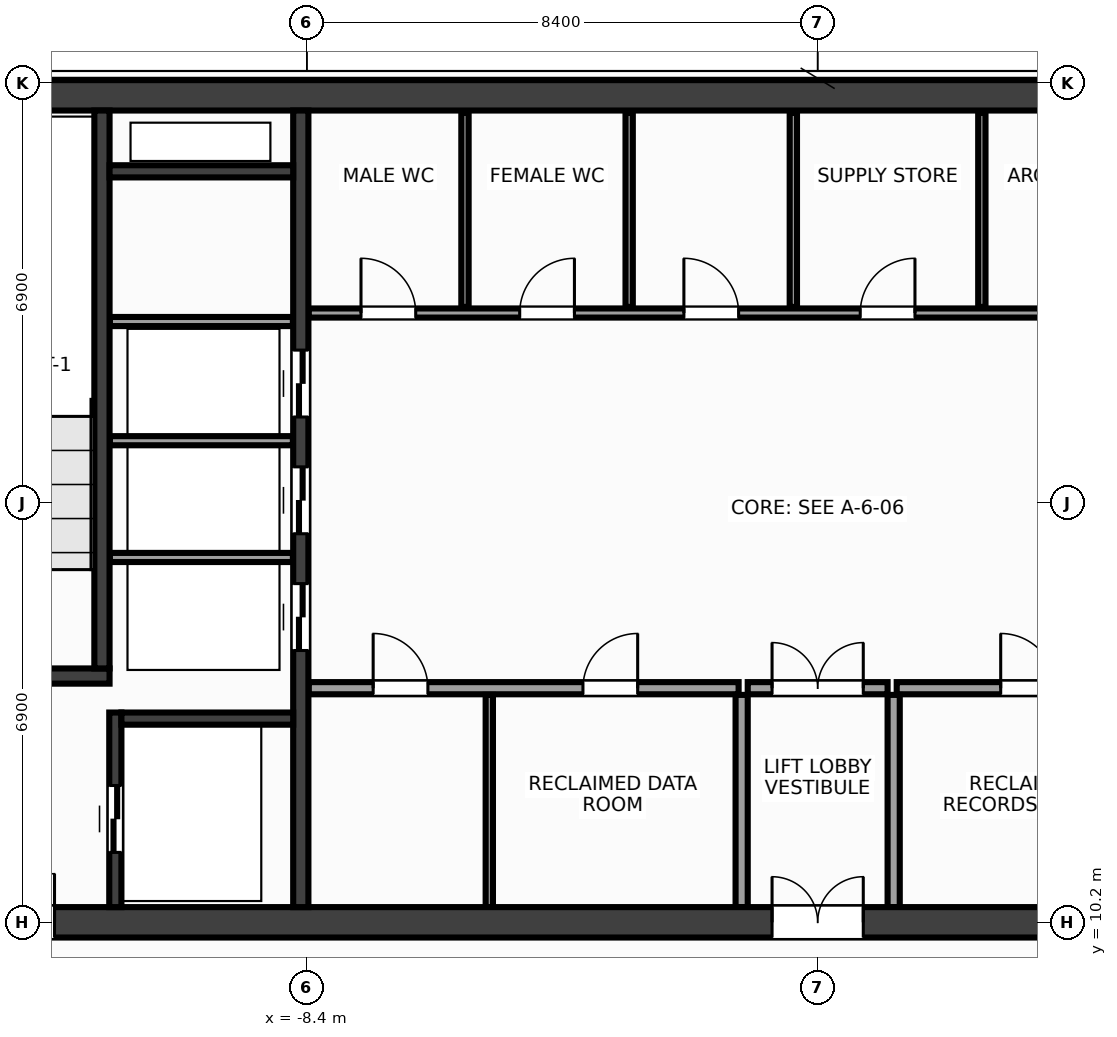
"""IFC4 building model, lengths in metres.
Left out: names, types, materials, properties, quantities, classifications, styles, units other than length and angle.
Written with IfcOpenShell. Run it as: python <this file> out.ifc"""

import sys

from ifc_helpers import new_model, si_unit, direction, frame, frame_2d, origin, place, context, subcontext, project, spatial, rectangle, extrude, source, transform, mapped, element, fill, save


model = new_model("IFC4")
c1 = context("Model", 3, precision=1e-05, world=origin(), true_north=direction((0.0, 1.0)))
c2 = subcontext(c1, "Body", "Model", "MODEL_VIEW")
j1 = project(units=[si_unit("LENGTHUNIT", "METRE"), si_unit("PLANEANGLEUNIT", "RADIAN")], contexts=[c1])
p1 = place(None, origin())
s1 = spatial("IfcSite", under=j1, at=p1, CompositionType="ELEMENT")
p2 = place(p1, origin())
s2 = spatial("IfcBuilding", under=s1, at=p2, CompositionType="ELEMENT")
p3 = place(p2, frame((0.0, 0.0, 261.2)))
s3 = spatial("IfcBuildingStorey", under=s2, at=p3, CompositionType="ELEMENT", Elevation=261.2)
m1 = source(origin(), c2, "Body", "SweptSolid", [
    extrude(rectangle(XDim=31.7, YDim=0.5, at=frame_2d((15.85, 0.0))), origin(), (0.0, 0.0, 1.0), 3.6),
])
p4 = place(p3, frame((-15.85, 23.8, 0.0), z_axis=(0.0, 0.0, 1.0), x_axis=(1.0, 0.0, 0.0)))
e1 = element("IfcWall", 1, at=p4, inside=s3, PredefinedType="SHEAR", context=c2, shape_type="MappedRepresentation", body=[
    mapped(m1, transform((0.0, 0.0, 0.0), x_axis=(1.0, 0.0, 0.0), y_axis=(0.0, 1.0, 0.0), z_axis=(0.0, 0.0, 1.0), scale=1.0)),
])
p5 = place(p3, frame((-15.85, 10.2, 0.0), z_axis=(0.0, 0.0, 1.0), x_axis=(1.0, 0.0, 0.0)))
e2 = element("IfcWall", 2, at=p5, inside=s3, PredefinedType="SHEAR", context=c2, shape_type="MappedRepresentation", body=[
    mapped(m1, transform((0.0, 0.0, 0.0), x_axis=(1.0, 0.0, 0.0), y_axis=(0.0, 1.0, 0.0), z_axis=(0.0, 0.0, 1.0), scale=1.0)),
])
p6 = place(p5, frame((1.7, 0.0, 0.0)))
e3 = element("IfcOpeningElement", 3, at=p6, cuts=e2, PredefinedType="OPENING", context=c2, shape_type="SweptSolid", body=[
    extrude(rectangle(XDim=1.6, YDim=2.15, at=frame_2d((0.8, 1.075))), frame((0.0, 0.262, 0.0), z_axis=(0.0, -1.0, 0.0), x_axis=(1.0, 0.0, 0.0)), (0.0, 0.0, 1.0), 0.524),
])
p7 = place(p5, frame((28.4, 0.0, 0.0)))
e4 = element("IfcOpeningElement", 4, at=p7, cuts=e2, PredefinedType="OPENING", context=c2, shape_type="SweptSolid", body=[
    extrude(rectangle(XDim=1.6, YDim=2.15, at=frame_2d((0.8, 1.075))), frame((0.0, 0.262, 0.0), z_axis=(0.0, -1.0, 0.0), x_axis=(1.0, 0.0, 0.0)), (0.0, 0.0, 1.0), 0.524),
])
p8 = place(p5, frame((15.1, 0.0, 0.0)))
e5 = element("IfcOpeningElement", 5, at=p8, cuts=e2, PredefinedType="OPENING", context=c2, shape_type="SweptSolid", body=[
    extrude(rectangle(XDim=1.5, YDim=2.2, at=frame_2d((0.75, 1.1))), frame((0.0, 0.262, 0.0), z_axis=(0.0, -1.0, 0.0), x_axis=(1.0, 0.0, 0.0)), (0.0, 0.0, 1.0), 0.524),
])
m2 = source(origin(), c2, "Body", "SweptSolid", [
    extrude(rectangle(XDim=13.1, YDim=0.25, at=frame_2d((6.55, 0.0))), origin(), (0.0, 0.0, 1.0), 3.6),
])
p9 = place(p3, frame((-8.5, 10.45, 0.0), z_axis=(0.0, 0.0, 1.0), x_axis=(0.0, 1.0, 0.0)))
e6 = element("IfcWall", 6, at=p9, inside=s3, PredefinedType="SHEAR", context=c2, shape_type="MappedRepresentation", body=[
    mapped(m2, transform((0.0, 0.0, 0.0), x_axis=(1.0, 0.0, 0.0), y_axis=(0.0, 1.0, 0.0), z_axis=(0.0, 0.0, 1.0), scale=1.0)),
])
p10 = place(p9, frame((4.22, 0.0, 0.0)))
e7 = element("IfcOpeningElement", 7, at=p10, cuts=e6, PredefinedType="OPENING", context=c2, shape_type="SweptSolid", body=[
    extrude(rectangle(XDim=1.1, YDim=2.15, at=frame_2d((0.55, 1.075))), frame((0.0, 0.137, 0.0), z_axis=(0.0, -1.0, 0.0), x_axis=(1.0, 0.0, 0.0)), (0.0, 0.0, 1.0), 0.274),
])
p11 = place(p9, frame((6.14, 0.0, 0.0)))
e8 = element("IfcOpeningElement", 8, at=p11, cuts=e6, PredefinedType="OPENING", context=c2, shape_type="SweptSolid", body=[
    extrude(rectangle(XDim=1.1, YDim=2.15, at=frame_2d((0.55, 1.075))), frame((0.0, 0.137, 0.0), z_axis=(0.0, -1.0, 0.0), x_axis=(1.0, 0.0, 0.0)), (0.0, 0.0, 1.0), 0.274),
])
p12 = place(p9, frame((8.06, 0.0, 0.0)))
e9 = element("IfcOpeningElement", 9, at=p12, cuts=e6, PredefinedType="OPENING", context=c2, shape_type="SweptSolid", body=[
    extrude(rectangle(XDim=1.1, YDim=2.15, at=frame_2d((0.55, 1.075))), frame((0.0, 0.137, 0.0), z_axis=(0.0, -1.0, 0.0), x_axis=(1.0, 0.0, 0.0)), (0.0, 0.0, 1.0), 0.274),
])
m3 = source(origin(), c2, "Body", "SweptSolid", [
    extrude(rectangle(XDim=3.705, YDim=0.25, at=frame_2d((1.853, 0.0))), origin(), (0.0, 0.0, 1.0), 3.6),
])
p13 = place(p3, frame((-15.35, 14.25, 0.0), z_axis=(0.0, 0.0, 1.0), x_axis=(1.0, 0.0, 0.0)))
e10 = element("IfcWall", 10, at=p13, inside=s3, PredefinedType="SHEAR", context=c2, shape_type="MappedRepresentation", body=[
    mapped(m3, transform((0.0, 0.0, 0.0), x_axis=(1.0, 0.0, 0.0), y_axis=(0.0, 1.0, 0.0), z_axis=(0.0, 0.0, 1.0), scale=1.0)),
])
p14 = place(p13, frame((0.95, 0.0, 0.0)))
e11 = element("IfcOpeningElement", 11, at=p14, cuts=e10, PredefinedType="OPENING", context=c2, shape_type="SweptSolid", body=[
    extrude(rectangle(XDim=1.6, YDim=2.15, at=frame_2d((0.8, 1.075))), frame((0.0, 0.137, 0.0), z_axis=(0.0, -1.0, 0.0), x_axis=(1.0, 0.0, 0.0)), (0.0, 0.0, 1.0), 0.274),
])
m4 = source(origin(), c2, "Body", "SweptSolid", [
    extrude(rectangle(XDim=9.175, YDim=0.25, at=frame_2d((4.587, 0.0))), origin(), (0.0, 0.0, 1.0), 3.6),
])
p15 = place(p3, frame((-11.77, 14.375, 0.0), z_axis=(0.0, 0.0, 1.0), x_axis=(0.0, 1.0, 0.0)))
e12 = element("IfcWall", 12, at=p15, inside=s3, PredefinedType="SHEAR", context=c2, shape_type="MappedRepresentation", body=[
    mapped(m4, transform((0.0, 0.0, 0.0), x_axis=(1.0, 0.0, 0.0), y_axis=(0.0, 1.0, 0.0), z_axis=(0.0, 0.0, 1.0), scale=1.0)),
])
m5 = source(origin(), c2, "Body", "SweptSolid", [
    extrude(rectangle(XDim=3.2, YDim=0.2, at=frame_2d((1.6, 0.0))), origin(), (0.0, 0.0, 1.0), 3.6),
])
p16 = place(p3, frame((-11.55, 10.45, 0.0), z_axis=(0.0, 0.0, 1.0), x_axis=(0.0, 1.0, 0.0)))
e13 = element("IfcWall", 13, at=p16, inside=s3, PredefinedType="SHEAR", context=c2, shape_type="MappedRepresentation", body=[
    mapped(m5, transform((0.0, 0.0, 0.0), x_axis=(1.0, 0.0, 0.0), y_axis=(0.0, 1.0, 0.0), z_axis=(0.0, 0.0, 1.0), scale=1.0)),
])
p17 = place(p16, frame((0.9, 0.0, 0.0)))
e14 = element("IfcOpeningElement", 14, at=p17, cuts=e13, PredefinedType="OPENING", context=c2, shape_type="SweptSolid", body=[
    extrude(rectangle(XDim=1.1, YDim=2.15, at=frame_2d((0.55, 1.075))), frame((0.0, 0.112, 0.0), z_axis=(0.0, -1.0, 0.0), x_axis=(1.0, 0.0, 0.0)), (0.0, 0.0, 1.0), 0.224),
])
m6 = source(origin(), c2, "Body", "SweptSolid", [
    extrude(rectangle(XDim=2.825, YDim=0.2, at=frame_2d((1.413, 0.0))), origin(), (0.0, 0.0, 1.0), 3.6),
])
p18 = place(p3, frame((-11.45, 13.55, 0.0), z_axis=(0.0, 0.0, 1.0), x_axis=(1.0, 0.0, 0.0)))
e15 = element("IfcWall", 15, at=p18, inside=s3, PredefinedType="SHEAR", context=c2, shape_type="MappedRepresentation", body=[
    mapped(m6, transform((0.0, 0.0, 0.0), x_axis=(1.0, 0.0, 0.0), y_axis=(0.0, 1.0, 0.0), z_axis=(0.0, 0.0, 1.0), scale=1.0)),
])
m7 = source(origin(), c2, "Body", "SweptSolid", [
    extrude(rectangle(XDim=3.02, YDim=0.2, at=frame_2d((1.51, 0.0))), origin(), (0.0, 0.0, 1.0), 3.6),
])
p19 = place(p3, frame((-11.645, 22.55, 0.0), z_axis=(0.0, 0.0, 1.0), x_axis=(1.0, 0.0, 0.0)))
e16 = element("IfcWall", 16, at=p19, inside=s3, PredefinedType="SHEAR", context=c2, shape_type="MappedRepresentation", body=[
    mapped(m7, transform((0.0, 0.0, 0.0), x_axis=(1.0, 0.0, 0.0), y_axis=(0.0, 1.0, 0.0), z_axis=(0.0, 0.0, 1.0), scale=1.0)),
])
m8 = source(origin(), c2, "Body", "SweptSolid", [
    extrude(rectangle(XDim=3.01, YDim=0.15, at=frame_2d((1.505, 0.0))), origin(), (0.0, 0.0, 1.0), 3.37),
])
for number, where, z_axis, x_axis in (
    (17, (-11.64, 16.2, 0.0), (0.0, 0.0, 1.0), (1.0, 0.0, 0.0)),
    (18, (-11.64, 18.12, 0.0), (0.0, 0.0, 1.0), (1.0, 0.0, 0.0)),
    (19, (-11.64, 20.08, 0.0), (0.0, 0.0, 1.0), (1.0, 0.0, 0.0)),
):
    element("IfcWall", number, at=place(p3, frame(where, z_axis=z_axis, x_axis=x_axis)), inside=s3, PredefinedType="PARTITIONING", context=c2, shape_type="MappedRepresentation", body=[
        mapped(m8, transform((0.0, 0.0, 0.0), x_axis=(1.0, 0.0, 0.0), y_axis=(0.0, 1.0, 0.0), z_axis=(0.0, 0.0, 1.0), scale=1.0)),
    ])
m9 = source(origin(), c2, "Body", "SweptSolid", [
    extrude(rectangle(XDim=7.07, YDim=0.2, at=frame_2d((3.535, 0.0))), origin(), (0.0, 0.0, 1.0), 3.37),
])
p20 = place(p3, frame((-8.37, 14.05, 0.0), z_axis=(0.0, 0.0, 1.0), x_axis=(1.0, 0.0, 0.0)))
e20 = element("IfcWall", 20, at=p20, inside=s3, PredefinedType="PARTITIONING", context=c2, shape_type="MappedRepresentation", body=[
    mapped(m9, transform((0.0, 0.0, 0.0), x_axis=(1.0, 0.0, 0.0), y_axis=(0.0, 1.0, 0.0), z_axis=(0.0, 0.0, 1.0), scale=1.0)),
])
p21 = place(p20, frame((1.06, 0.0, 0.0)))
e21 = element("IfcOpeningElement", 21, at=p21, cuts=e20, PredefinedType="OPENING", context=c2, shape_type="SweptSolid", body=[
    extrude(rectangle(XDim=0.9, YDim=2.15, at=frame_2d((0.45, 1.075))), frame((0.0, 0.112, 0.0), z_axis=(0.0, -1.0, 0.0), x_axis=(1.0, 0.0, 0.0)), (0.0, 0.0, 1.0), 0.224),
])
p22 = place(p20, frame((4.51, 0.0, 0.0)))
e22 = element("IfcOpeningElement", 22, at=p22, cuts=e20, PredefinedType="OPENING", context=c2, shape_type="SweptSolid", body=[
    extrude(rectangle(XDim=0.9, YDim=2.15, at=frame_2d((0.45, 1.075))), frame((0.0, 0.112, 0.0), z_axis=(0.0, -1.0, 0.0), x_axis=(1.0, 0.0, 0.0)), (0.0, 0.0, 1.0), 0.224),
])
p23 = place(p3, frame((1.3, 14.05, 0.0), z_axis=(0.0, 0.0, 1.0), x_axis=(1.0, 0.0, 0.0)))
e23 = element("IfcWall", 23, at=p23, inside=s3, PredefinedType="PARTITIONING", context=c2, shape_type="MappedRepresentation", body=[
    mapped(m9, transform((0.0, 0.0, 0.0), x_axis=(1.0, 0.0, 0.0), y_axis=(0.0, 1.0, 0.0), z_axis=(0.0, 0.0, 1.0), scale=1.0)),
])
p24 = place(p23, frame((1.71, 0.0, 0.0)))
e24 = element("IfcOpeningElement", 24, at=p24, cuts=e23, PredefinedType="OPENING", context=c2, shape_type="SweptSolid", body=[
    extrude(rectangle(XDim=0.9, YDim=2.15, at=frame_2d((0.45, 1.075))), frame((0.0, 0.112, 0.0), z_axis=(0.0, -1.0, 0.0), x_axis=(1.0, 0.0, 0.0)), (0.0, 0.0, 1.0), 0.224),
])
p25 = place(p23, frame((5.16, 0.0, 0.0)))
e25 = element("IfcOpeningElement", 25, at=p25, cuts=e23, PredefinedType="OPENING", context=c2, shape_type="SweptSolid", body=[
    extrude(rectangle(XDim=0.9, YDim=2.15, at=frame_2d((0.45, 1.075))), frame((0.0, 0.112, 0.0), z_axis=(0.0, -1.0, 0.0), x_axis=(1.0, 0.0, 0.0)), (0.0, 0.0, 1.0), 0.224),
])
m10 = source(origin(), c2, "Body", "SweptSolid", [
    extrude(rectangle(XDim=3.49, YDim=0.2, at=frame_2d((1.745, 0.0))), origin(), (0.0, 0.0, 1.0), 3.37),
])
for number, where, z_axis, x_axis in (
    (26, (-1.25, 10.45, 0.0), (0.0, 0.0, 1.0), (0.0, 1.0, 0.0)),
    (27, (1.25, 10.45, 0.0), (0.0, 0.0, 1.0), (0.0, 1.0, 0.0)),
):
    element("IfcWall", number, at=place(p3, frame(where, z_axis=z_axis, x_axis=x_axis)), inside=s3, PredefinedType="PARTITIONING", context=c2, shape_type="MappedRepresentation", body=[
        mapped(m10, transform((0.0, 0.0, 0.0), x_axis=(1.0, 0.0, 0.0), y_axis=(0.0, 1.0, 0.0), z_axis=(0.0, 0.0, 1.0), scale=1.0)),
    ])
m11 = source(origin(), c2, "Body", "SweptSolid", [
    extrude(rectangle(XDim=2.3, YDim=0.2, at=frame_2d((1.15, 0.0))), origin(), (0.0, 0.0, 1.0), 3.37),
])
p26 = place(p3, frame((-1.15, 14.05, 0.0), z_axis=(0.0, 0.0, 1.0), x_axis=(1.0, 0.0, 0.0)))
e28 = element("IfcWall", 28, at=p26, inside=s3, PredefinedType="PARTITIONING", context=c2, shape_type="MappedRepresentation", body=[
    mapped(m11, transform((0.0, 0.0, 0.0), x_axis=(1.0, 0.0, 0.0), y_axis=(0.0, 1.0, 0.0), z_axis=(0.0, 0.0, 1.0), scale=1.0)),
])
p27 = place(p26, frame((0.4, 0.0, 0.0)))
e29 = element("IfcOpeningElement", 29, at=p27, cuts=e28, PredefinedType="OPENING", context=c2, shape_type="SweptSolid", body=[
    extrude(rectangle(XDim=1.5, YDim=2.2, at=frame_2d((0.75, 1.1))), frame((0.0, 0.112, 0.0), z_axis=(0.0, -1.0, 0.0), x_axis=(1.0, 0.0, 0.0)), (0.0, 0.0, 1.0), 0.224),
])
m12 = source(origin(), c2, "Body", "SweptSolid", [
    extrude(rectangle(XDim=14.59, YDim=0.15, at=frame_2d((7.295, 0.0))), origin(), (0.0, 0.0, 1.0), 3.37),
])
p28 = place(p3, frame((-8.37, 20.22, 0.0), z_axis=(0.0, 0.0, 1.0), x_axis=(1.0, 0.0, 0.0)))
e30 = element("IfcWall", 30, at=p28, inside=s3, PredefinedType="PARTITIONING", context=c2, shape_type="MappedRepresentation", body=[
    mapped(m12, transform((0.0, 0.0, 0.0), x_axis=(1.0, 0.0, 0.0), y_axis=(0.0, 1.0, 0.0), z_axis=(0.0, 0.0, 1.0), scale=1.0)),
])
p29 = place(p28, frame((0.86, 0.0, 0.0)))
e31 = element("IfcOpeningElement", 31, at=p29, cuts=e30, PredefinedType="OPENING", context=c2, shape_type="SweptSolid", body=[
    extrude(rectangle(XDim=0.9, YDim=2.15, at=frame_2d((0.45, 1.075))), frame((0.0, 0.087, 0.0), z_axis=(0.0, -1.0, 0.0), x_axis=(1.0, 0.0, 0.0)), (0.0, 0.0, 1.0), 0.174),
])
p30 = place(p28, frame((3.47, 0.0, 0.0)))
e32 = element("IfcOpeningElement", 32, at=p30, cuts=e30, PredefinedType="OPENING", context=c2, shape_type="SweptSolid", body=[
    extrude(rectangle(XDim=0.9, YDim=2.15, at=frame_2d((0.45, 1.075))), frame((0.0, 0.087, 0.0), z_axis=(0.0, -1.0, 0.0), x_axis=(1.0, 0.0, 0.0)), (0.0, 0.0, 1.0), 0.174),
])
p31 = place(p28, frame((6.17, 0.0, 0.0)))
e33 = element("IfcOpeningElement", 33, at=p31, cuts=e30, PredefinedType="OPENING", context=c2, shape_type="SweptSolid", body=[
    extrude(rectangle(XDim=0.9, YDim=2.15, at=frame_2d((0.45, 1.075))), frame((0.0, 0.087, 0.0), z_axis=(0.0, -1.0, 0.0), x_axis=(1.0, 0.0, 0.0)), (0.0, 0.0, 1.0), 0.174),
])
p32 = place(p28, frame((9.07, 0.0, 0.0)))
e34 = element("IfcOpeningElement", 34, at=p32, cuts=e30, PredefinedType="OPENING", context=c2, shape_type="SweptSolid", body=[
    extrude(rectangle(XDim=0.9, YDim=2.15, at=frame_2d((0.45, 1.075))), frame((0.0, 0.087, 0.0), z_axis=(0.0, -1.0, 0.0), x_axis=(1.0, 0.0, 0.0)), (0.0, 0.0, 1.0), 0.174),
])
p33 = place(p28, frame((12.32, 0.0, 0.0)))
e35 = element("IfcOpeningElement", 35, at=p33, cuts=e30, PredefinedType="OPENING", context=c2, shape_type="SweptSolid", body=[
    extrude(rectangle(XDim=0.9, YDim=2.15, at=frame_2d((0.45, 1.075))), frame((0.0, 0.087, 0.0), z_axis=(0.0, -1.0, 0.0), x_axis=(1.0, 0.0, 0.0)), (0.0, 0.0, 1.0), 0.174),
])
m13 = source(origin(), c2, "Body", "SweptSolid", [
    extrude(rectangle(XDim=3.49, YDim=0.12, at=frame_2d((1.745, 0.0))), origin(), (0.0, 0.0, 1.0), 3.37),
])
p34 = place(p3, frame((-5.4, 10.45, 0.0), z_axis=(0.0, 0.0, 1.0), x_axis=(0.0, 1.0, 0.0)))
e36 = element("IfcWall", 36, at=p34, inside=s3, PredefinedType="PARTITIONING", context=c2, shape_type="MappedRepresentation", body=[
    mapped(m13, transform((0.0, 0.0, 0.0), x_axis=(1.0, 0.0, 0.0), y_axis=(0.0, 1.0, 0.0), z_axis=(0.0, 0.0, 1.0), scale=1.0)),
])
m14 = source(origin(), c2, "Body", "SweptSolid", [
    extrude(rectangle(XDim=3.19, YDim=0.12, at=frame_2d((1.595, 0.0))), origin(), (0.0, 0.0, 1.0), 3.37),
])
for number, where, z_axis, x_axis in (
    (37, (-5.8, 20.32, 0.0), (0.0, 0.0, 1.0), (0.0, 1.0, 0.0)),
    (38, (-3.1, 20.32, 0.0), (0.0, 0.0, 1.0), (0.0, 1.0, 0.0)),
    (39, (-0.4, 20.32, 0.0), (0.0, 0.0, 1.0), (0.0, 1.0, 0.0)),
    (40, (2.7, 20.32, 0.0), (0.0, 0.0, 1.0), (0.0, 1.0, 0.0)),
):
    element("IfcWall", number, at=place(p3, frame(where, z_axis=z_axis, x_axis=x_axis)), inside=s3, PredefinedType="PARTITIONING", context=c2, shape_type="MappedRepresentation", body=[
        mapped(m14, transform((0.0, 0.0, 0.0), x_axis=(1.0, 0.0, 0.0), y_axis=(0.0, 1.0, 0.0), z_axis=(0.0, 0.0, 1.0), scale=1.0)),
    ])
m15 = source(origin(), c2, "Body", "SweptSolid", [
    extrude(rectangle(XDim=1.6, YDim=2.15, at=frame_2d((0.8, 1.075))), frame((0.0, 0.025, 0.0), z_axis=(0.0, -1.0, 0.0), x_axis=(1.0, 0.0, 0.0)), (0.0, 0.0, 1.0), 0.05),
])
p35 = place(p6, origin())
e41 = element("IfcDoor", 41, at=p35, inside=s3, OperationType="DOUBLE_DOOR_SINGLE_SWING", PredefinedType="DOOR", context=c2, shape_type="MappedRepresentation", body=[
    mapped(m15, transform((0.0, 0.0, 0.0), x_axis=(1.0, 0.0, 0.0), y_axis=(0.0, 1.0, 0.0), z_axis=(0.0, 0.0, 1.0), scale=1.0)),
])
fill(e3, e41)
m16 = source(origin(), c2, "Body", "SweptSolid", [
    extrude(rectangle(XDim=1.1, YDim=2.15, at=frame_2d((0.55, 1.075))), frame((0.0, 0.025, 0.0), z_axis=(0.0, -1.0, 0.0), x_axis=(1.0, 0.0, 0.0)), (0.0, 0.0, 1.0), 0.05),
])
p36 = place(p17, origin())
e42 = element("IfcDoor", 42, at=p36, inside=s3, OperationType="DOUBLE_DOOR_SLIDING", PredefinedType="DOOR", context=c2, shape_type="MappedRepresentation", body=[
    mapped(m16, transform((0.0, 0.0, 0.0), x_axis=(1.0, 0.0, 0.0), y_axis=(0.0, 1.0, 0.0), z_axis=(0.0, 0.0, 1.0), scale=1.0)),
])
fill(e14, e42)
p37 = place(p10, origin())
e43 = element("IfcDoor", 43, at=p37, inside=s3, OperationType="DOUBLE_DOOR_SLIDING", PredefinedType="DOOR", context=c2, shape_type="MappedRepresentation", body=[
    mapped(m16, transform((0.0, 0.0, 0.0), x_axis=(1.0, 0.0, 0.0), y_axis=(0.0, 1.0, 0.0), z_axis=(0.0, 0.0, 1.0), scale=1.0)),
])
fill(e7, e43)
p38 = place(p11, origin())
e44 = element("IfcDoor", 44, at=p38, inside=s3, OperationType="DOUBLE_DOOR_SLIDING", PredefinedType="DOOR", context=c2, shape_type="MappedRepresentation", body=[
    mapped(m16, transform((0.0, 0.0, 0.0), x_axis=(1.0, 0.0, 0.0), y_axis=(0.0, 1.0, 0.0), z_axis=(0.0, 0.0, 1.0), scale=1.0)),
])
fill(e8, e44)
p39 = place(p12, origin())
e45 = element("IfcDoor", 45, at=p39, inside=s3, OperationType="DOUBLE_DOOR_SLIDING", PredefinedType="DOOR", context=c2, shape_type="MappedRepresentation", body=[
    mapped(m16, transform((0.0, 0.0, 0.0), x_axis=(1.0, 0.0, 0.0), y_axis=(0.0, 1.0, 0.0), z_axis=(0.0, 0.0, 1.0), scale=1.0)),
])
fill(e9, e45)
m17 = source(origin(), c2, "Body", "SweptSolid", [
    extrude(rectangle(XDim=0.9, YDim=2.15, at=frame_2d((0.45, 1.075))), frame((0.0, 0.025, 0.0), z_axis=(0.0, -1.0, 0.0), x_axis=(1.0, 0.0, 0.0)), (0.0, 0.0, 1.0), 0.05),
])
p40 = place(p21, origin())
e46 = element("IfcDoor", 46, at=p40, inside=s3, OperationType="SINGLE_SWING_LEFT", PredefinedType="DOOR", context=c2, shape_type="MappedRepresentation", body=[
    mapped(m17, transform((0.0, 0.0, 0.0), x_axis=(1.0, 0.0, 0.0), y_axis=(0.0, 1.0, 0.0), z_axis=(0.0, 0.0, 1.0), scale=1.0)),
])
fill(e21, e46)
p41 = place(p22, origin())
e47 = element("IfcDoor", 47, at=p41, inside=s3, OperationType="SINGLE_SWING_RIGHT", PredefinedType="DOOR", context=c2, shape_type="MappedRepresentation", body=[
    mapped(m17, transform((0.0, 0.0, 0.0), x_axis=(1.0, 0.0, 0.0), y_axis=(0.0, 1.0, 0.0), z_axis=(0.0, 0.0, 1.0), scale=1.0)),
])
fill(e22, e47)
p42 = place(p24, origin())
e48 = element("IfcDoor", 48, at=p42, inside=s3, OperationType="SINGLE_SWING_LEFT", PredefinedType="DOOR", context=c2, shape_type="MappedRepresentation", body=[
    mapped(m17, transform((0.0, 0.0, 0.0), x_axis=(1.0, 0.0, 0.0), y_axis=(0.0, 1.0, 0.0), z_axis=(0.0, 0.0, 1.0), scale=1.0)),
])
fill(e24, e48)
m18 = source(origin(), c2, "Body", "SweptSolid", [
    extrude(rectangle(XDim=1.5, YDim=2.2, at=frame_2d((0.75, 1.1))), frame((0.0, 0.025, 0.0), z_axis=(0.0, -1.0, 0.0), x_axis=(1.0, 0.0, 0.0)), (0.0, 0.0, 1.0), 0.05),
])
p43 = place(p27, origin())
e49 = element("IfcDoor", 49, at=p43, inside=s3, OperationType="DOUBLE_DOOR_SINGLE_SWING", PredefinedType="DOOR", context=c2, shape_type="MappedRepresentation", body=[
    mapped(m18, transform((0.0, 0.0, 0.0), x_axis=(1.0, 0.0, 0.0), y_axis=(0.0, 1.0, 0.0), z_axis=(0.0, 0.0, 1.0), scale=1.0)),
])
fill(e29, e49)
p44 = place(p8, origin())
e50 = element("IfcDoor", 50, at=p44, inside=s3, OperationType="DOUBLE_DOOR_SINGLE_SWING", PredefinedType="DOOR", context=c2, shape_type="MappedRepresentation", body=[
    mapped(m18, transform((0.0, 0.0, 0.0), x_axis=(1.0, 0.0, 0.0), y_axis=(0.0, 1.0, 0.0), z_axis=(0.0, 0.0, 1.0), scale=1.0)),
])
fill(e5, e50)
p45 = place(p29, origin())
e51 = element("IfcDoor", 51, at=p45, inside=s3, OperationType="SINGLE_SWING_LEFT", PredefinedType="DOOR", context=c2, shape_type="MappedRepresentation", body=[
    mapped(m17, transform((0.0, 0.0, 0.0), x_axis=(1.0, 0.0, 0.0), y_axis=(0.0, 1.0, 0.0), z_axis=(0.0, 0.0, 1.0), scale=1.0)),
])
fill(e31, e51)
p46 = place(p30, origin())
e52 = element("IfcDoor", 52, at=p46, inside=s3, OperationType="SINGLE_SWING_RIGHT", PredefinedType="DOOR", context=c2, shape_type="MappedRepresentation", body=[
    mapped(m17, transform((0.0, 0.0, 0.0), x_axis=(1.0, 0.0, 0.0), y_axis=(0.0, 1.0, 0.0), z_axis=(0.0, 0.0, 1.0), scale=1.0)),
])
fill(e32, e52)
p47 = place(p31, origin())
e53 = element("IfcDoor", 53, at=p47, inside=s3, OperationType="SINGLE_SWING_LEFT", PredefinedType="DOOR", context=c2, shape_type="MappedRepresentation", body=[
    mapped(m17, transform((0.0, 0.0, 0.0), x_axis=(1.0, 0.0, 0.0), y_axis=(0.0, 1.0, 0.0), z_axis=(0.0, 0.0, 1.0), scale=1.0)),
])
fill(e33, e53)
p48 = place(p32, origin())
e54 = element("IfcDoor", 54, at=p48, inside=s3, OperationType="SINGLE_SWING_RIGHT", PredefinedType="DOOR", context=c2, shape_type="MappedRepresentation", body=[
    mapped(m17, transform((0.0, 0.0, 0.0), x_axis=(1.0, 0.0, 0.0), y_axis=(0.0, 1.0, 0.0), z_axis=(0.0, 0.0, 1.0), scale=1.0)),
])
fill(e34, e54)
save(model, sys.argv[1])
